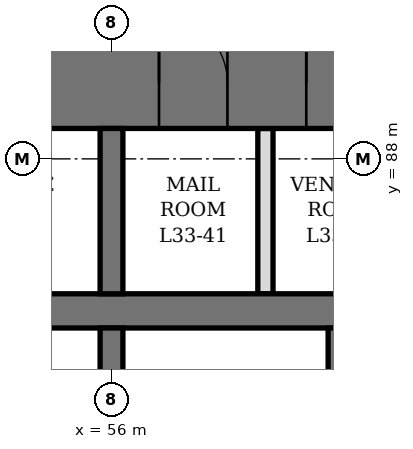
"""IFC4 building model, lengths in metres.
Left out: names, types, materials, properties, quantities, classifications, styles, units other than length and angle.
Written with IfcOpenShell. Run it as: python <this file> out.ifc"""

import sys

from ifc_helpers import new_model, si_unit, direction, frame, frame_2d, origin, place, context, subcontext, project, spatial, rectangle, extrude, element, fill, save


model = new_model("IFC4")
c1 = context("Model", 3, precision=1e-05, world=origin(), true_north=direction((0.0, 1.0)))
c2 = subcontext(c1, "Body", "Model", "MODEL_VIEW")
j1 = project(units=[si_unit("LENGTHUNIT", "METRE"), si_unit("PLANEANGLEUNIT", "RADIAN")], contexts=[c1])
p1 = place(None, origin())
s1 = spatial("IfcSite", under=j1, at=p1, CompositionType="ELEMENT")
p2 = place(p1, origin())
s2 = spatial("IfcBuilding", under=s1, at=p2, CompositionType="ELEMENT")
p3 = place(p2, frame((0.0, 0.0, 150.1)))
s3 = spatial("IfcBuildingStorey", under=s2, at=p3, CompositionType="ELEMENT", Elevation=150.1)
p4 = place(p3, frame((44.6, 89.0, 0.0), z_axis=(0.0, 0.0, 1.0), x_axis=(1.0, 0.0, 0.0)))
e1 = element("IfcWall", 1, at=p4, inside=s3, PredefinedType="SHEAR", context=c2, shape_type="SweptSolid", body=[
    extrude(rectangle(XDim=22.8, YDim=1.2, at=frame_2d((11.4, 0.0))), origin(), (0.0, 0.0, 1.0), 4.2),
])
p5 = place(p4, frame((9.275, 0.0, 0.0)))
e2 = element("IfcOpeningElement", 2, at=p5, cuts=e1, PredefinedType="OPENING", context=c2, shape_type="SweptSolid", body=[
    extrude(rectangle(XDim=1.0, YDim=2.1, at=frame_2d((0.5, 1.05))), frame((0.0, 0.61, 0.0), z_axis=(0.0, -1.0, 0.0), x_axis=(1.0, 0.0, 0.0)), (0.0, 0.0, 1.0), 1.22),
])
p6 = place(p4, frame((6.45, 0.0, 0.0)))
e3 = element("IfcOpeningElement", 3, at=p6, cuts=e1, PredefinedType="OPENING", context=c2, shape_type="SweptSolid", body=[
    extrude(rectangle(XDim=0.9, YDim=2.1, at=frame_2d((0.45, 1.05))), frame((0.0, 0.61, 0.0), z_axis=(0.0, -1.0, 0.0), x_axis=(1.0, 0.0, 0.0)), (0.0, 0.0, 1.0), 1.22),
])
p7 = place(p4, frame((12.025, 0.0, 0.0)))
e4 = element("IfcOpeningElement", 4, at=p7, cuts=e1, PredefinedType="OPENING", context=c2, shape_type="SweptSolid", body=[
    extrude(rectangle(XDim=0.9, YDim=2.1, at=frame_2d((0.45, 1.05))), frame((0.0, 0.61, 0.0), z_axis=(0.0, -1.0, 0.0), x_axis=(1.0, 0.0, 0.0)), (0.0, 0.0, 1.0), 1.22),
])
p8 = place(p4, frame((13.962, 0.0, 0.0)))
e5 = element("IfcOpeningElement", 5, at=p8, cuts=e1, PredefinedType="OPENING", context=c2, shape_type="SweptSolid", body=[
    extrude(rectangle(XDim=0.9, YDim=2.1, at=frame_2d((0.45, 1.05))), frame((0.0, 0.61, 0.0), z_axis=(0.0, -1.0, 0.0), x_axis=(1.0, 0.0, 0.0)), (0.0, 0.0, 1.0), 1.22),
])
p9 = place(p3, frame((50.225, 86.0, 0.0), z_axis=(0.0, 0.0, 1.0), x_axis=(1.0, 0.0, 0.0)))
e6 = element("IfcWall", 6, at=p9, inside=s3, PredefinedType="SHEAR", context=c2, shape_type="SweptSolid", body=[
    extrude(rectangle(XDim=11.55, YDim=0.45, at=frame_2d((5.775, 0.0))), origin(), (0.0, 0.0, 1.0), 4.2),
])
for number, where, z_axis, x_axis in (
    (7, (56.0, 82.225, 0.0), (0.0, 0.0, 1.0), (0.0, 1.0, 0.0)),
    (8, (59.0, 82.225, 0.0), (0.0, 0.0, 1.0), (0.0, 1.0, 0.0)),
):
    element("IfcWall", number, at=place(p3, frame(where, z_axis=z_axis, x_axis=x_axis)), inside=s3, PredefinedType="SHEAR", context=c2, shape_type="SweptSolid", body=[
        extrude(rectangle(XDim=3.55, YDim=0.3, at=frame_2d((1.775, 0.0))), origin(), (0.0, 0.0, 1.0), 4.2),
    ])
p10 = place(p3, frame((56.0, 86.225, 0.0), z_axis=(0.0, 0.0, 1.0), x_axis=(0.0, 1.0, 0.0)))
e9 = element("IfcWall", 9, at=p10, inside=s3, PredefinedType="SHEAR", context=c2, shape_type="SweptSolid", body=[
    extrude(rectangle(XDim=2.175, YDim=0.3, at=frame_2d((1.087, 0.0))), origin(), (0.0, 0.0, 1.0), 4.2),
])
p11 = place(p3, frame((58.025, 86.225, 0.0), z_axis=(0.0, 0.0, 1.0), x_axis=(0.0, 1.0, 0.0)))
e10 = element("IfcWall", 10, at=p11, inside=s3, PredefinedType="PARTITIONING", context=c2, shape_type="SweptSolid", body=[
    extrude(rectangle(XDim=2.175, YDim=0.2, at=frame_2d((1.087, 0.0))), origin(), (0.0, 0.0, 1.0), 4.04),
])
p12 = place(p7, origin())
e11 = element("IfcDoor", 11, at=p12, inside=s3, OperationType="SINGLE_SWING_LEFT", PredefinedType="DOOR", context=c2, shape_type="SweptSolid", body=[
    extrude(rectangle(XDim=0.9, YDim=2.1, at=frame_2d((0.45, 1.05))), frame((0.0, 0.35, 0.0), z_axis=(0.0, -1.0, 0.0), x_axis=(1.0, 0.0, 0.0)), (0.0, 0.0, 1.0), 0.7),
])
fill(e4, e11)
p13 = place(p8, origin())
e12 = element("IfcDoor", 12, at=p13, inside=s3, OperationType="SINGLE_SWING_LEFT", PredefinedType="DOOR", context=c2, shape_type="SweptSolid", body=[
    extrude(rectangle(XDim=0.9, YDim=2.1, at=frame_2d((0.45, 1.05))), frame((0.0, 0.35, 0.0), z_axis=(0.0, -1.0, 0.0), x_axis=(1.0, 0.0, 0.0)), (0.0, 0.0, 1.0), 0.7),
])
fill(e5, e12)
save(model, sys.argv[1])
